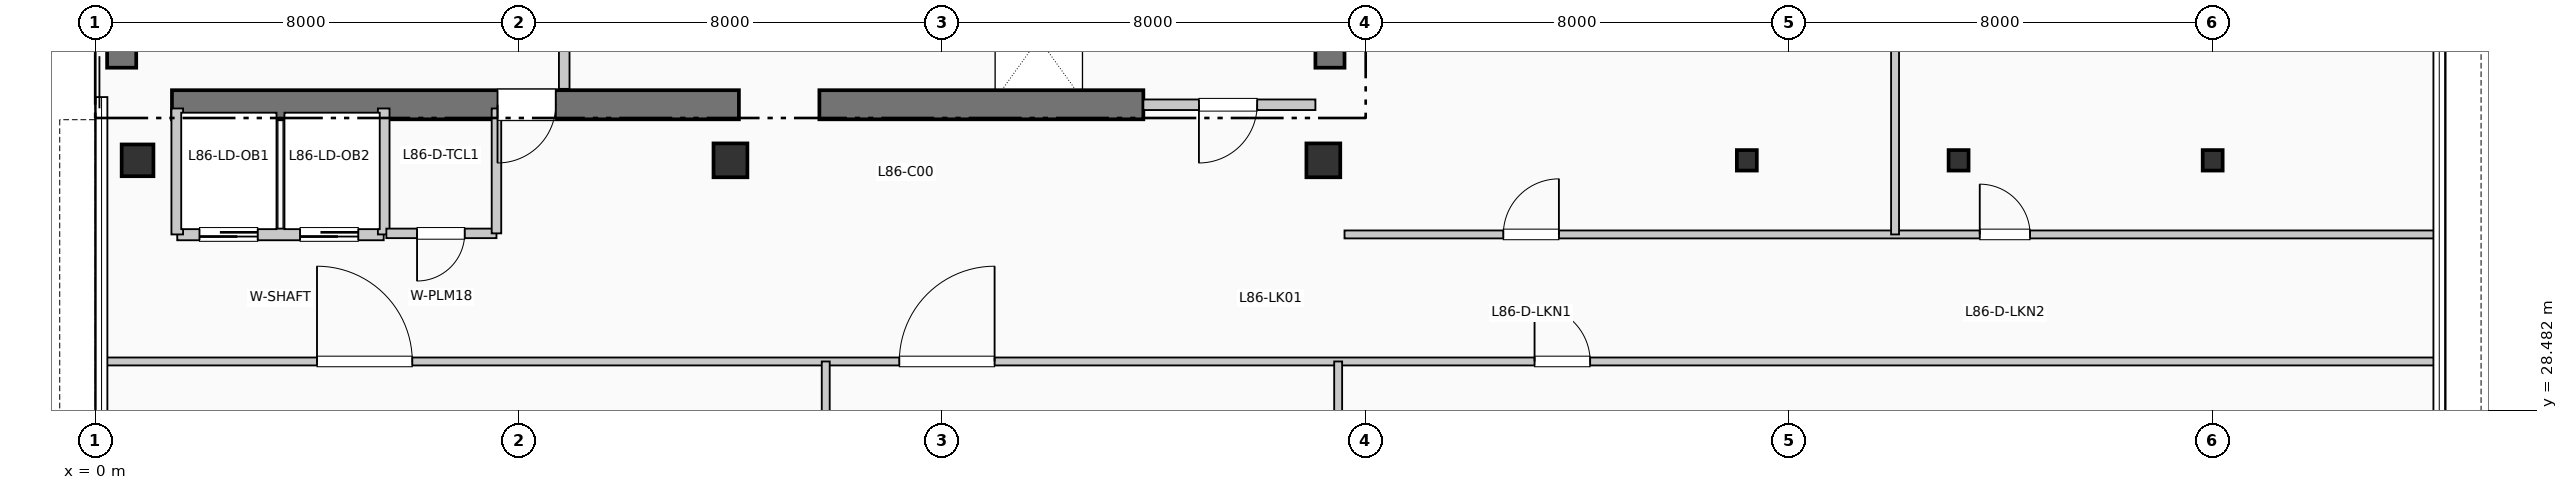
"""IFC4 building model, lengths in metres.
Left out: names, types, materials, properties, quantities, classifications, styles, units other than length and angle.
Written with IfcOpenShell. Run it as: python <this file> out.ifc"""

import sys

from ifc_helpers import new_model, si_unit, direction, frame, frame_2d, origin, origin_2d, place, context, subcontext, project, spatial, rectangle, i_section, extrude, element, fill, save


model = new_model("IFC4")
c1 = context("Model", 3, precision=1e-05, world=origin(), true_north=direction((0.0, 1.0)))
c2 = subcontext(c1, "Body", "Model", "MODEL_VIEW")
j1 = project(units=[si_unit("LENGTHUNIT", "METRE"), si_unit("PLANEANGLEUNIT", "RADIAN")], contexts=[c1])
p1 = place(None, origin())
s1 = spatial("IfcSite", under=j1, at=p1, CompositionType="ELEMENT")
p2 = place(p1, origin())
s2 = spatial("IfcBuilding", under=s1, at=p2, CompositionType="ELEMENT")
p3 = place(p2, frame((0.0, 0.0, 352.11)))
s3 = spatial("IfcBuildingStorey", under=s2, at=p3, CompositionType="ELEMENT", Elevation=352.11)
p4 = place(p3, frame((0.5, 34.95, 0.0), z_axis=(0.0, 0.0, 1.0), x_axis=(0.0, 1.0, 0.0)))
e1 = element("IfcWall", 1, at=p4, inside=s3, PredefinedType="SHEAR", context=c2, shape_type="SweptSolid", body=[
    extrude(rectangle(XDim=7.9, YDim=0.55, at=frame_2d((3.95, 0.0))), origin(), (0.0, 0.0, 1.0), 4.62),
])
p5 = place(p3, frame((23.325, 34.95, 0.0), z_axis=(0.0, 0.0, 1.0), x_axis=(0.0, 1.0, 0.0)))
e2 = element("IfcWall", 2, at=p5, inside=s3, PredefinedType="SHEAR", context=c2, shape_type="SweptSolid", body=[
    extrude(rectangle(XDim=10.64, YDim=0.55, at=frame_2d((5.32, 0.0))), origin(), (0.0, 0.0, 1.0), 4.62),
])
p6 = place(p3, frame((1.45, 34.25, 0.0), z_axis=(0.0, 0.0, 1.0), x_axis=(1.0, 0.0, 0.0)))
e3 = element("IfcWall", 3, at=p6, inside=s3, PredefinedType="SHEAR", context=c2, shape_type="SweptSolid", body=[
    extrude(rectangle(XDim=10.71, YDim=0.55, at=frame_2d((5.355, 0.0))), origin(), (0.0, 0.0, 1.0), 4.62),
])
p7 = place(p6, frame((7.25, 0.0, 0.0), z_axis=(0.0, 0.0, 1.0), x_axis=(-1.0, 0.0, 0.0)))
e4 = element("IfcOpeningElement", 4, at=p7, cuts=e3, PredefinedType="OPENING", context=c2, shape_type="SweptSolid", body=[
    extrude(rectangle(XDim=1.1, YDim=2.15, at=frame_2d((0.55, 1.075))), frame((0.0, 0.285, 0.0), z_axis=(0.0, -1.0, 0.0), x_axis=(1.0, 0.0, 0.0)), (0.0, 0.0, 1.0), 0.57),
])
p8 = place(p3, frame((13.68, 34.25, 0.0), z_axis=(0.0, 0.0, 1.0), x_axis=(1.0, 0.0, 0.0)))
e5 = element("IfcWall", 5, at=p8, inside=s3, PredefinedType="SHEAR", context=c2, shape_type="SweptSolid", body=[
    extrude(rectangle(XDim=6.12, YDim=0.55, at=frame_2d((3.06, 0.0))), origin(), (0.0, 0.0, 1.0), 4.62),
])
p9 = place(p3, frame((0.8, 33.2, 0.0), z_axis=(0.0, 0.0, 1.0), x_axis=(1.0, 0.0, 0.0)))
e6 = element("IfcColumn", 6, at=p9, inside=s3, PredefinedType="COLUMN", context=c2, shape_type="SweptSolid", body=[
    extrude(rectangle(XDim=0.6, YDim=0.6, at=origin_2d()), origin(), (0.0, 0.0, 1.0), 4.62),
])
for number, where, z_axis, x_axis in (
    (7, (12.0, 33.2, 0.0), (0.0, 0.0, 1.0), (1.0, 0.0, 0.0)),
    (8, (23.2, 33.2, 0.0), (0.0, 0.0, 1.0), (1.0, 0.0, 0.0)),
):
    element("IfcColumn", number, at=place(p3, frame(where, z_axis=z_axis, x_axis=x_axis)), inside=s3, PredefinedType="COLUMN", context=c2, shape_type="SweptSolid", body=[
        extrude(rectangle(XDim=0.64, YDim=0.64, at=origin_2d()), origin(), (0.0, 0.0, 1.0), 4.62),
    ])
for number, where, z_axis, x_axis in (
    (9, (31.2, 33.2, 0.0), (0.0, 0.0, 1.0), (1.0, 0.0, 0.0)),
    (10, (35.2, 33.2, 0.0), (0.0, 0.0, 1.0), (1.0, 0.0, 0.0)),
    (11, (40.0, 33.2, 0.0), (0.0, 0.0, 1.0), (1.0, 0.0, 0.0)),
):
    element("IfcColumn", number, at=place(p3, frame(where, z_axis=z_axis, x_axis=x_axis)), inside=s3, PredefinedType="COLUMN", context=c2, shape_type="SweptSolid", body=[
        extrude(i_section(OverallWidth=0.377, OverallDepth=0.387, WebThickness=0.016, FlangeThickness=0.027, at=origin_2d()), origin(), (0.0, 0.0, 1.0), 4.62),
    ])
p10 = place(p3, frame((8.86, 34.55, 0.0), z_axis=(0.0, 0.0, 1.0), x_axis=(0.0, 1.0, 0.0)))
e12 = element("IfcWall", 12, at=p10, inside=s3, PredefinedType="PARTITIONING", context=c2, shape_type="SweptSolid", body=[
    extrude(rectangle(XDim=2.5, YDim=0.2, at=frame_2d((1.25, 0.0))), origin(), (0.0, 0.0, 1.0), 4.37),
])
p11 = place(p3, frame((19.8, 34.25, 0.0), z_axis=(0.0, 0.0, 1.0), x_axis=(1.0, 0.0, 0.0)))
e13 = element("IfcWall", 13, at=p11, inside=s3, PredefinedType="PARTITIONING", context=c2, shape_type="SweptSolid", body=[
    extrude(rectangle(XDim=3.25, YDim=0.2, at=frame_2d((1.625, 0.0))), origin(), (0.0, 0.0, 1.0), 4.37),
])
p12 = place(p11, frame((2.15, 0.0, 0.0), z_axis=(0.0, 0.0, 1.0), x_axis=(-1.0, 0.0, 0.0)))
e14 = element("IfcOpeningElement", 14, at=p12, cuts=e13, PredefinedType="OPENING", context=c2, shape_type="SweptSolid", body=[
    extrude(rectangle(XDim=1.1, YDim=2.15, at=frame_2d((0.55, 1.075))), frame((0.0, 0.11, 0.0), z_axis=(0.0, -1.0, 0.0), x_axis=(1.0, 0.0, 0.0)), (0.0, 0.0, 1.0), 0.22),
])
p13 = place(p3, frame((1.55, 31.8, 0.0), z_axis=(0.0, 0.0, 1.0), x_axis=(1.0, 0.0, 0.0)))
e15 = element("IfcWall", 15, at=p13, inside=s3, PredefinedType="PARTITIONING", context=c2, shape_type="SweptSolid", body=[
    extrude(rectangle(XDim=3.9, YDim=0.22, at=frame_2d((1.95, 0.0))), origin(), (0.0, 0.0, 1.0), 4.37),
])
p14 = place(p13, frame((1.52, 0.0, 0.0), z_axis=(0.0, 0.0, 1.0), x_axis=(-1.0, 0.0, 0.0)))
e16 = element("IfcOpeningElement", 16, at=p14, cuts=e15, PredefinedType="OPENING", context=c2, shape_type="SweptSolid", body=[
    extrude(rectangle(XDim=1.1, YDim=2.2, at=frame_2d((0.55, 1.1))), frame((0.0, 0.12, 0.0), z_axis=(0.0, -1.0, 0.0), x_axis=(1.0, 0.0, 0.0)), (0.0, 0.0, 1.0), 0.24),
])
p15 = place(p13, frame((3.42, 0.0, 0.0), z_axis=(0.0, 0.0, 1.0), x_axis=(-1.0, 0.0, 0.0)))
e17 = element("IfcOpeningElement", 17, at=p15, cuts=e15, PredefinedType="OPENING", context=c2, shape_type="SweptSolid", body=[
    extrude(rectangle(XDim=1.1, YDim=2.2, at=frame_2d((0.55, 1.1))), frame((0.0, 0.12, 0.0), z_axis=(0.0, -1.0, 0.0), x_axis=(1.0, 0.0, 0.0)), (0.0, 0.0, 1.0), 0.24),
])
for number, where, z_axis, x_axis in (
    (18, (1.55, 31.8, 0.0), (0.0, 0.0, 1.0), (0.0, 1.0, 0.0)),
    (19, (5.45, 31.8, 0.0), (0.0, 0.0, 1.0), (0.0, 1.0, 0.0)),
):
    element("IfcWall", number, at=place(p3, frame(where, z_axis=z_axis, x_axis=x_axis)), inside=s3, PredefinedType="PARTITIONING", context=c2, shape_type="SweptSolid", body=[
        extrude(rectangle(XDim=2.38, YDim=0.22, at=frame_2d((1.19, 0.0))), origin(), (0.0, 0.0, 1.0), 4.37),
    ])
p16 = place(p3, frame((5.5, 31.82, 0.0), z_axis=(0.0, 0.0, 1.0), x_axis=(1.0, 0.0, 0.0)))
e20 = element("IfcWall", 20, at=p16, inside=s3, PredefinedType="PLUMBINGWALL", context=c2, shape_type="SweptSolid", body=[
    extrude(rectangle(XDim=2.08, YDim=0.18, at=frame_2d((1.04, 0.0))), origin(), (0.0, 0.0, 1.0), 4.37),
])
p17 = place(p16, frame((1.48, 0.0, 0.0), z_axis=(0.0, 0.0, 1.0), x_axis=(-1.0, 0.0, 0.0)))
e21 = element("IfcOpeningElement", 21, at=p17, cuts=e20, PredefinedType="OPENING", context=c2, shape_type="SweptSolid", body=[
    extrude(rectangle(XDim=0.9, YDim=2.1, at=frame_2d((0.45, 1.05))), frame((0.0, 0.1, 0.0), z_axis=(0.0, -1.0, 0.0), x_axis=(1.0, 0.0, 0.0)), (0.0, 0.0, 1.0), 0.2),
])
p18 = place(p3, frame((7.58, 31.82, 0.0), z_axis=(0.0, 0.0, 1.0), x_axis=(0.0, 1.0, 0.0)))
e22 = element("IfcWall", 22, at=p18, inside=s3, PredefinedType="PLUMBINGWALL", context=c2, shape_type="SweptSolid", body=[
    extrude(rectangle(XDim=2.36, YDim=0.18, at=frame_2d((1.18, 0.0))), origin(), (0.0, 0.0, 1.0), 4.37),
])
p19 = place(p3, frame((0.19, 29.4, 0.0), z_axis=(0.0, 0.0, 1.0), x_axis=(1.0, 0.0, 0.0)))
e23 = element("IfcWall", 23, at=p19, inside=s3, PredefinedType="PARTITIONING", context=c2, shape_type="SweptSolid", body=[
    extrude(rectangle(XDim=44.02, YDim=0.15, at=frame_2d((22.01, 0.0))), origin(), (0.0, 0.0, 1.0), 4.055),
])
p20 = place(p19, frame((4.0, 0.0, 0.0)))
e24 = element("IfcOpeningElement", 24, at=p20, cuts=e23, PredefinedType="OPENING", context=c2, shape_type="SweptSolid", body=[
    extrude(rectangle(XDim=1.8, YDim=2.3, at=frame_2d((0.9, 1.15))), frame((0.0, 0.085, 0.0), z_axis=(0.0, -1.0, 0.0), x_axis=(1.0, 0.0, 0.0)), (0.0, 0.0, 1.0), 0.17),
])
p21 = place(p19, frame((15.0, 0.0, 0.0)))
e25 = element("IfcOpeningElement", 25, at=p21, cuts=e23, PredefinedType="OPENING", context=c2, shape_type="SweptSolid", body=[
    extrude(rectangle(XDim=1.8, YDim=2.3, at=frame_2d((0.9, 1.15))), frame((0.0, 0.085, 0.0), z_axis=(0.0, -1.0, 0.0), x_axis=(1.0, 0.0, 0.0)), (0.0, 0.0, 1.0), 0.17),
])
p22 = place(p19, frame((27.0, 0.0, 0.0)))
e26 = element("IfcOpeningElement", 26, at=p22, cuts=e23, PredefinedType="OPENING", context=c2, shape_type="SweptSolid", body=[
    extrude(rectangle(XDim=1.05, YDim=2.15, at=frame_2d((0.525, 1.075))), frame((0.0, 0.085, 0.0), z_axis=(0.0, -1.0, 0.0), x_axis=(1.0, 0.0, 0.0)), (0.0, 0.0, 1.0), 0.17),
])
p23 = place(p3, frame((23.6, 31.8, 0.0), z_axis=(0.0, 0.0, 1.0), x_axis=(1.0, 0.0, 0.0)))
e27 = element("IfcWall", 27, at=p23, inside=s3, PredefinedType="PARTITIONING", context=c2, shape_type="SweptSolid", body=[
    extrude(rectangle(XDim=20.61, YDim=0.15, at=frame_2d((10.305, 0.0))), origin(), (0.0, 0.0, 1.0), 4.37),
])
p24 = place(p23, frame((3.0, 0.0, 0.0)))
e28 = element("IfcOpeningElement", 28, at=p24, cuts=e27, PredefinedType="OPENING", context=c2, shape_type="SweptSolid", body=[
    extrude(rectangle(XDim=1.05, YDim=2.15, at=frame_2d((0.525, 1.075))), frame((0.0, 0.085, 0.0), z_axis=(0.0, -1.0, 0.0), x_axis=(1.0, 0.0, 0.0)), (0.0, 0.0, 1.0), 0.17),
])
p25 = place(p23, frame((12.0, 0.0, 0.0)))
e29 = element("IfcOpeningElement", 29, at=p25, cuts=e27, PredefinedType="OPENING", context=c2, shape_type="SweptSolid", body=[
    extrude(rectangle(XDim=0.95, YDim=2.15, at=frame_2d((0.475, 1.075))), frame((0.0, 0.085, 0.0), z_axis=(0.0, -1.0, 0.0), x_axis=(1.0, 0.0, 0.0)), (0.0, 0.0, 1.0), 0.17),
])
p26 = place(p3, frame((13.8, 11.79, 0.0), z_axis=(0.0, 0.0, 1.0), x_axis=(0.0, 1.0, 0.0)))
e30 = element("IfcWall", 30, at=p26, inside=s3, PredefinedType="PARTITIONING", context=c2, shape_type="SweptSolid", body=[
    extrude(rectangle(XDim=17.61, YDim=0.15, at=frame_2d((8.805, 0.0))), origin(), (0.0, 0.0, 1.0), 4.37),
])
p27 = place(p3, frame((23.48, 25.19, 0.0), z_axis=(0.0, 0.0, 1.0), x_axis=(0.0, 1.0, 0.0)))
e31 = element("IfcWall", 31, at=p27, inside=s3, PredefinedType="PARTITIONING", context=c2, shape_type="SweptSolid", body=[
    extrude(rectangle(XDim=4.21, YDim=0.15, at=frame_2d((2.105, 0.0))), origin(), (0.0, 0.0, 1.0), 3.855),
])
p28 = place(p3, frame((34.0, 31.8, 0.0), z_axis=(0.0, 0.0, 1.0), x_axis=(0.0, 1.0, 0.0)))
e32 = element("IfcWall", 32, at=p28, inside=s3, PredefinedType="PARTITIONING", context=c2, shape_type="SweptSolid", body=[
    extrude(rectangle(XDim=14.01, YDim=0.15, at=frame_2d((7.005, 0.0))), origin(), (0.0, 0.0, 1.0), 4.37),
])
p29 = place(p7, origin())
e33 = element("IfcDoor", 33, at=p29, inside=s3, OperationType="SINGLE_SWING_LEFT", PredefinedType="DOOR", context=c2, shape_type="SweptSolid", body=[
    extrude(rectangle(XDim=1.1, YDim=2.15, at=frame_2d((0.55, 1.075))), frame((0.0, 0.025, 0.0), z_axis=(0.0, -1.0, 0.0), x_axis=(1.0, 0.0, 0.0)), (0.0, 0.0, 1.0), 0.05),
])
fill(e4, e33)
p30 = place(p12, origin())
e34 = element("IfcDoor", 34, at=p30, inside=s3, OperationType="SINGLE_SWING_LEFT", PredefinedType="DOOR", context=c2, shape_type="SweptSolid", body=[
    extrude(rectangle(XDim=1.1, YDim=2.15, at=frame_2d((0.55, 1.075))), frame((0.0, 0.025, 0.0), z_axis=(0.0, -1.0, 0.0), x_axis=(1.0, 0.0, 0.0)), (0.0, 0.0, 1.0), 0.05),
])
fill(e14, e34)
p31 = place(p14, origin())
e35 = element("IfcDoor", 35, at=p31, inside=s3, OperationType="SLIDING_TO_LEFT", PredefinedType="DOOR", context=c2, shape_type="SweptSolid", body=[
    extrude(rectangle(XDim=1.1, YDim=2.2, at=frame_2d((0.55, 1.1))), frame((0.0, 0.025, 0.0), z_axis=(0.0, -1.0, 0.0), x_axis=(1.0, 0.0, 0.0)), (0.0, 0.0, 1.0), 0.05),
])
fill(e16, e35)
p32 = place(p15, origin())
e36 = element("IfcDoor", 36, at=p32, inside=s3, OperationType="SLIDING_TO_LEFT", PredefinedType="DOOR", context=c2, shape_type="SweptSolid", body=[
    extrude(rectangle(XDim=1.1, YDim=2.2, at=frame_2d((0.55, 1.1))), frame((0.0, 0.025, 0.0), z_axis=(0.0, -1.0, 0.0), x_axis=(1.0, 0.0, 0.0)), (0.0, 0.0, 1.0), 0.05),
])
fill(e17, e36)
p33 = place(p17, origin())
e37 = element("IfcDoor", 37, at=p33, inside=s3, OperationType="SINGLE_SWING_LEFT", PredefinedType="DOOR", context=c2, shape_type="SweptSolid", body=[
    extrude(rectangle(XDim=0.9, YDim=2.1, at=frame_2d((0.45, 1.05))), frame((0.0, 0.025, 0.0), z_axis=(0.0, -1.0, 0.0), x_axis=(1.0, 0.0, 0.0)), (0.0, 0.0, 1.0), 0.05),
])
fill(e21, e37)
p34 = place(p20, origin())
e38 = element("IfcDoor", 38, at=p34, inside=s3, OperationType="SINGLE_SWING_LEFT", PredefinedType="DOOR", context=c2, shape_type="SweptSolid", body=[
    extrude(rectangle(XDim=1.8, YDim=2.3, at=frame_2d((0.9, 1.15))), frame((0.0, 0.025, 0.0), z_axis=(0.0, -1.0, 0.0), x_axis=(1.0, 0.0, 0.0)), (0.0, 0.0, 1.0), 0.05),
])
fill(e24, e38)
p35 = place(p21, origin())
e39 = element("IfcDoor", 39, at=p35, inside=s3, OperationType="SINGLE_SWING_RIGHT", PredefinedType="DOOR", context=c2, shape_type="SweptSolid", body=[
    extrude(rectangle(XDim=1.8, YDim=2.3, at=frame_2d((0.9, 1.15))), frame((0.0, 0.025, 0.0), z_axis=(0.0, -1.0, 0.0), x_axis=(1.0, 0.0, 0.0)), (0.0, 0.0, 1.0), 0.05),
])
fill(e25, e39)
p36 = place(p22, origin())
e40 = element("IfcDoor", 40, at=p36, inside=s3, OperationType="SINGLE_SWING_LEFT", PredefinedType="DOOR", context=c2, shape_type="SweptSolid", body=[
    extrude(rectangle(XDim=1.05, YDim=2.15, at=frame_2d((0.525, 1.075))), frame((0.0, 0.025, 0.0), z_axis=(0.0, -1.0, 0.0), x_axis=(1.0, 0.0, 0.0)), (0.0, 0.0, 1.0), 0.05),
])
fill(e26, e40)
p37 = place(p24, origin())
e41 = element("IfcDoor", 41, at=p37, inside=s3, OperationType="SINGLE_SWING_RIGHT", PredefinedType="DOOR", context=c2, shape_type="SweptSolid", body=[
    extrude(rectangle(XDim=1.05, YDim=2.15, at=frame_2d((0.525, 1.075))), frame((0.0, 0.025, 0.0), z_axis=(0.0, -1.0, 0.0), x_axis=(1.0, 0.0, 0.0)), (0.0, 0.0, 1.0), 0.05),
])
fill(e28, e41)
p38 = place(p25, origin())
e42 = element("IfcDoor", 42, at=p38, inside=s3, OperationType="SINGLE_SWING_LEFT", PredefinedType="DOOR", context=c2, shape_type="SweptSolid", body=[
    extrude(rectangle(XDim=0.95, YDim=2.15, at=frame_2d((0.475, 1.075))), frame((0.0, 0.025, 0.0), z_axis=(0.0, -1.0, 0.0), x_axis=(1.0, 0.0, 0.0)), (0.0, 0.0, 1.0), 0.05),
])
fill(e29, e42)
save(model, sys.argv[1])
